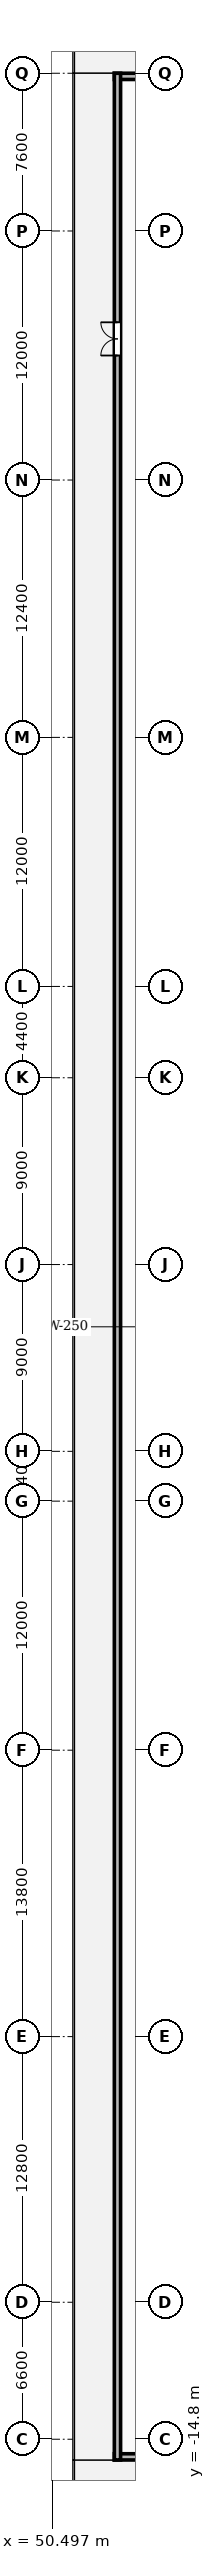
"""IFC4 building model, lengths in metres.
Left out: names, types, materials, properties, quantities, classifications, styles, units other than length and angle.
Written with IfcOpenShell. Run it as: python <this file> out.ifc"""

import sys

from ifc_helpers import new_model, si_unit, direction, frame, frame_2d, origin, place, context, subcontext, project, spatial, rectangle, extrude, element, fill, save


model = new_model("IFC4")
c1 = context("Model", 3, precision=1e-05, world=origin(), true_north=direction((0.0, 1.0)))
c2 = subcontext(c1, "Body", "Model", "MODEL_VIEW")
j1 = project(units=[si_unit("LENGTHUNIT", "METRE"), si_unit("PLANEANGLEUNIT", "RADIAN")], contexts=[c1])
p1 = place(None, origin())
s1 = spatial("IfcSite", under=j1, at=p1, CompositionType="ELEMENT")
p2 = place(p1, origin())
s2 = spatial("IfcBuilding", under=s1, at=p2, CompositionType="ELEMENT")
p3 = place(p2, frame((0.0, 0.0, 19.0)))
s3 = spatial("IfcBuildingStorey", under=s2, at=p3, CompositionType="ELEMENT", Elevation=19.0)
p4 = place(p3, frame((53.5, -15.65, 0.0), z_axis=(0.0, 0.0, 1.0), x_axis=(1.0, 0.0, 0.0)))
e1 = element("IfcWall", 1, at=p4, inside=s3, PredefinedType="STANDARD", context=c2, shape_type="SweptSolid", body=[
    extrude(rectangle(XDim=34.5, YDim=0.3, at=frame_2d((17.25, 0.0))), origin(), (0.0, 0.0, 1.0), 4.68),
])
p5 = place(p4, frame((14.0, 0.0, 0.0)))
e2 = element("IfcOpeningElement", 2, at=p5, cuts=e1, PredefinedType="OPENING", context=c2, shape_type="SweptSolid", body=[
    extrude(rectangle(XDim=1.6, YDim=2.2, at=frame_2d((0.8, 1.1))), frame((0.0, 0.16, 0.0), z_axis=(0.0, -1.0, 0.0), x_axis=(1.0, 0.0, 0.0)), (0.0, 0.0, 1.0), 0.32),
])
p6 = place(p4, frame((24.0, 0.0, 0.9)))
e3 = element("IfcOpeningElement", 3, at=p6, cuts=e1, PredefinedType="OPENING", context=c2, shape_type="SweptSolid", body=[
    extrude(rectangle(XDim=3.0, YDim=2.6, at=frame_2d((1.5, 1.3))), frame((0.0, 0.16, 0.0), z_axis=(0.0, -1.0, 0.0), x_axis=(1.0, 0.0, 0.0)), (0.0, 0.0, 1.0), 0.32),
])
p7 = place(p3, frame((86.0, 99.05, 0.0), z_axis=(0.0, 0.0, 1.0), x_axis=(-1.0, 0.0, 0.0)))
e4 = element("IfcWall", 4, at=p7, inside=s3, PredefinedType="STANDARD", context=c2, shape_type="SweptSolid", body=[
    extrude(rectangle(XDim=32.5, YDim=0.3, at=frame_2d((16.25, 0.0))), origin(), (0.0, 0.0, 1.0), 4.68),
])
p8 = place(p3, frame((53.65, 99.2, 0.0), z_axis=(0.0, 0.0, 1.0), x_axis=(0.0, -1.0, 0.0)))
e5 = element("IfcWall", 5, at=p8, inside=s3, PredefinedType="STANDARD", context=c2, shape_type="SweptSolid", body=[
    extrude(rectangle(XDim=115.0, YDim=0.3, at=frame_2d((57.5, 0.0))), origin(), (0.0, 0.0, 1.0), 4.68),
])
p9 = place(p8, frame((12.0, 0.0, 0.0)))
e6 = element("IfcOpeningElement", 6, at=p9, cuts=e5, PredefinedType="OPENING", context=c2, shape_type="SweptSolid", body=[
    extrude(rectangle(XDim=1.6, YDim=2.2, at=frame_2d((0.8, 1.1))), frame((0.0, 0.16, 0.0), z_axis=(0.0, -1.0, 0.0), x_axis=(1.0, 0.0, 0.0)), (0.0, 0.0, 1.0), 0.32),
])
p10 = place(p9, frame((1.6, 0.0, 0.0), z_axis=(0.0, 0.0, 1.0), x_axis=(-1.0, 0.0, 0.0)))
e7 = element("IfcDoor", 7, at=p10, inside=s3, OperationType="DOUBLE_DOOR_SINGLE_SWING", PredefinedType="DOOR", context=c2, shape_type="SweptSolid", body=[
    extrude(rectangle(XDim=1.6, YDim=2.2, at=frame_2d((0.8, 1.1))), frame((0.0, 0.025, 0.0), z_axis=(0.0, -1.0, 0.0), x_axis=(1.0, 0.0, 0.0)), (0.0, 0.0, 1.0), 0.05),
])
fill(e6, e7)
save(model, sys.argv[1])
